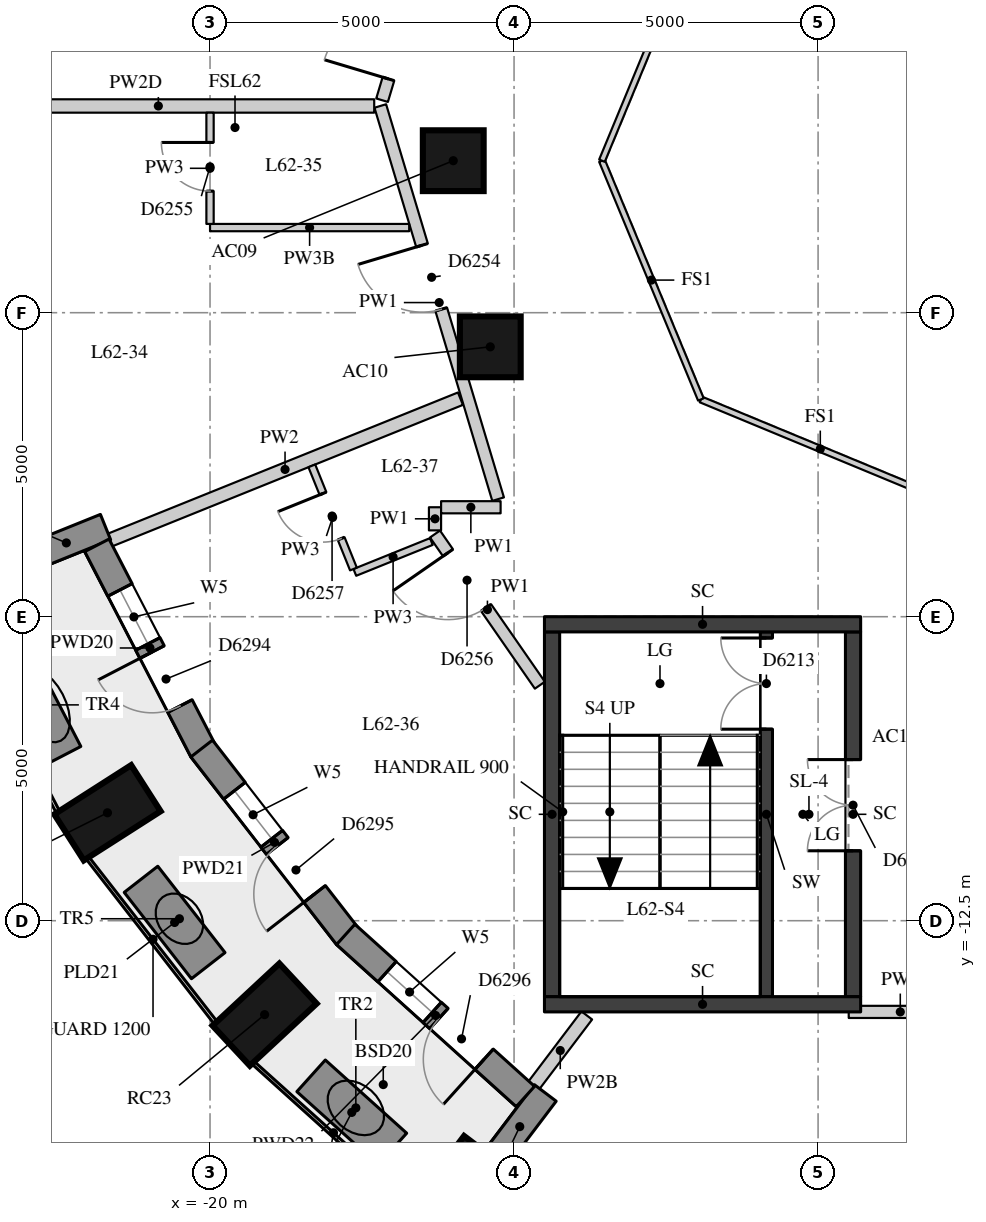
"""IFC4 building model, lengths in metres.
Left out: names, types, materials, properties, quantities, classifications, styles, units other than length and angle.
Written with IfcOpenShell. Run it as: python <this file> out.ifc"""

import sys

from ifc_helpers import new_model, si_unit, direction, frame, frame_2d, origin, origin_2d, place, context, subcontext, project, spatial, rectangle, extrude, element, fill, save


model = new_model("IFC4")
c1 = context("Model", 3, precision=1e-05, world=origin(), true_north=direction((0.0, 1.0)))
c2 = subcontext(c1, "Body", "Model", "MODEL_VIEW")
j1 = project(units=[si_unit("LENGTHUNIT", "METRE"), si_unit("PLANEANGLEUNIT", "RADIAN")], contexts=[c1])
p1 = place(None, origin())
s1 = spatial("IfcSite", under=j1, at=p1, CompositionType="ELEMENT")
p2 = place(p1, origin())
s2 = spatial("IfcBuilding", under=s1, at=p2, CompositionType="ELEMENT")
p3 = place(p2, frame((0.0, 0.0, 218.9)))
s3 = spatial("IfcBuildingStorey", under=s2, at=p3, CompositionType="ELEMENT", Elevation=218.9)
for number, where, z_axis, x_axis in (
    (1, (-21.687, -10.725, 0.0), (0.0, 0.0, 1.0), (-0.842, -0.539, 0.0)),
    (2, (-19.102, -14.045, 0.0), (0.0, 0.0, 1.0), (-0.732, -0.681, 0.0)),
    (3, (-15.916, -16.911, 0.0), (0.0, 0.0, 1.0), (-0.604, -0.797, 0.0)),
):
    element("IfcColumn", number, at=place(p3, frame(where, z_axis=z_axis, x_axis=x_axis)), inside=s3, PredefinedType="COLUMN", context=c2, shape_type="SweptSolid", body=[
        extrude(rectangle(XDim=1.5, YDim=0.9, at=origin_2d()), origin(), (0.0, 0.0, 1.0), 3.3),
    ])
for number, where, z_axis, x_axis in (
    (4, (-16.0, 0.0, 0.0), (0.0, 0.0, 1.0), (1.0, 0.0, 0.0)),
    (5, (-15.391, -3.062, 0.0), (0.0, 0.0, 1.0), (1.0, 0.0, 0.0)),
):
    element("IfcColumn", number, at=place(p3, frame(where, z_axis=z_axis, x_axis=x_axis)), inside=s3, PredefinedType="COLUMN", context=c2, shape_type="SweptSolid", body=[
        extrude(rectangle(XDim=1.0, YDim=1.0, at=origin_2d()), origin(), (0.0, 0.0, 1.0), 3.3),
    ])
p4 = place(p3, frame((-23.008, -6.546, 0.0), z_axis=(0.0, 0.0, 1.0), x_axis=(0.927346156366, 0.37420463155, 0.0)))
e6 = element("IfcWall", 6, at=p4, inside=s3, PredefinedType="SOLIDWALL", context=c2, shape_type="SweptSolid", body=[
    extrude(rectangle(XDim=1.39, YDim=0.45, at=frame_2d((0.695, 0.0))), origin(), (0.0, 0.0, 1.0), 3.02),
])
p5 = place(p3, frame((-15.326, -16.442, 0.0), z_axis=(0.0, 0.0, 1.0), x_axis=(0.603644757989, 0.797253414011, 0.0)))
e7 = element("IfcWall", 7, at=p5, inside=s3, PredefinedType="SOLIDWALL", context=c2, shape_type="SweptSolid", body=[
    extrude(rectangle(XDim=1.391, YDim=0.45, at=frame_2d((0.695, 0.0))), origin(), (0.0, 0.0, 1.0), 2.57),
])
p6 = place(p3, frame((-21.861, -6.326, 0.0), z_axis=(0.0, 0.0, 1.0), x_axis=(0.45924645187, -0.888308896975, 0.0)))
e8 = element("IfcWall", 8, at=p6, inside=s3, PredefinedType="SOLIDWALL", context=c2, shape_type="SweptSolid", body=[
    extrude(rectangle(XDim=3.802, YDim=0.45, at=frame_2d((1.901, 0.0))), origin(), (0.0, 0.0, 1.0), 3.02),
])
p7 = place(p6, frame((0.826, 0.0, 0.4)))
e9 = element("IfcOpeningElement", 9, at=p7, cuts=e8, PredefinedType="OPENING", context=c2, shape_type="SweptSolid", body=[
    extrude(rectangle(XDim=1.0, YDim=1.75, at=frame_2d((0.5, 0.875))), frame((0.0, 0.235, 0.0), z_axis=(0.0, -1.0, 0.0), x_axis=(1.0, 0.0, 0.0)), (0.0, 0.0, 1.0), 0.47),
])
p8 = place(p6, frame((1.976, 0.0, 0.0)))
e10 = element("IfcOpeningElement", 10, at=p8, cuts=e8, PredefinedType="OPENING", context=c2, shape_type="SweptSolid", body=[
    extrude(rectangle(XDim=1.0, YDim=2.15, at=frame_2d((0.5, 1.075))), frame((0.0, 0.235, 0.0), z_axis=(0.0, -1.0, 0.0), x_axis=(1.0, 0.0, 0.0)), (0.0, 0.0, 1.0), 0.47),
])
p9 = place(p3, frame((-20.137, -9.668, 0.0), z_axis=(0.0, 0.0, 1.0), x_axis=(0.613157177014, -0.789960933386, 0.0)))
e11 = element("IfcWall", 11, at=p9, inside=s3, PredefinedType="SOLIDWALL", context=c2, shape_type="SweptSolid", body=[
    extrude(rectangle(XDim=3.906, YDim=0.45, at=frame_2d((1.953, 0.0))), origin(), (0.0, 0.0, 1.0), 3.02),
])
p10 = place(p9, frame((0.878, 0.0, 0.4)))
e12 = element("IfcOpeningElement", 12, at=p10, cuts=e11, PredefinedType="OPENING", context=c2, shape_type="SweptSolid", body=[
    extrude(rectangle(XDim=1.0, YDim=1.75, at=frame_2d((0.5, 0.875))), frame((0.0, 0.235, 0.0), z_axis=(0.0, -1.0, 0.0), x_axis=(1.0, 0.0, 0.0)), (0.0, 0.0, 1.0), 0.47),
])
p11 = place(p9, frame((2.028, 0.0, 0.0)))
e13 = element("IfcOpeningElement", 13, at=p11, cuts=e11, PredefinedType="OPENING", context=c2, shape_type="SweptSolid", body=[
    extrude(rectangle(XDim=1.0, YDim=2.15, at=frame_2d((0.5, 1.075))), frame((0.0, 0.235, 0.0), z_axis=(0.0, -1.0, 0.0), x_axis=(1.0, 0.0, 0.0)), (0.0, 0.0, 1.0), 0.47),
])
p12 = place(p3, frame((-17.769, -12.725, 0.0), z_axis=(0.0, 0.0, 1.0), x_axis=(0.742485377568, -0.669862272484, 0.0)))
e14 = element("IfcWall", 14, at=p12, inside=s3, PredefinedType="SOLIDWALL", context=c2, shape_type="SweptSolid", body=[
    extrude(rectangle(XDim=3.98, YDim=0.45, at=frame_2d((1.99, 0.0))), origin(), (0.0, 0.0, 1.0), 3.02),
])
p13 = place(p12, frame((0.915, 0.0, 0.4)))
e15 = element("IfcOpeningElement", 15, at=p13, cuts=e14, PredefinedType="OPENING", context=c2, shape_type="SweptSolid", body=[
    extrude(rectangle(XDim=1.0, YDim=1.75, at=frame_2d((0.5, 0.875))), frame((0.0, 0.235, 0.0), z_axis=(0.0, -1.0, 0.0), x_axis=(1.0, 0.0, 0.0)), (0.0, 0.0, 1.0), 0.47),
])
p14 = place(p12, frame((2.065, 0.0, 0.0)))
e16 = element("IfcOpeningElement", 16, at=p14, cuts=e14, PredefinedType="OPENING", context=c2, shape_type="SweptSolid", body=[
    extrude(rectangle(XDim=1.0, YDim=2.15, at=frame_2d((0.5, 1.075))), frame((0.0, 0.235, 0.0), z_axis=(0.0, -1.0, 0.0), x_axis=(1.0, 0.0, 0.0)), (0.0, 0.0, 1.0), 0.47),
])
for number, where, z_axis, x_axis in (
    (17, (-23.264, -8.197, 0.0), (0.0, 0.0, 1.0), (0.46, -0.888, 0.0)),
    (18, (-21.135, -11.819, 0.0), (0.0, 0.0, 1.0), (0.614, -0.789, 0.0)),
    (19, (-18.338, -15.051, 0.0), (0.0, 0.0, 1.0), (0.743, -0.669, 0.0)),
):
    element("IfcWall", number, at=place(p3, frame(where, z_axis=z_axis, x_axis=x_axis)), inside=s3, PredefinedType="USERDEFINED", context=c2, shape_type="SweptSolid", body=[
        extrude(rectangle(XDim=1.8, YDim=0.7, at=frame_2d((0.9, 0.0))), origin(), (0.0, 0.0, 1.0), 0.75),
    ])
p15 = place(p3, frame((-10.85, -13.75, 0.0), z_axis=(0.0, 0.0, 1.0), x_axis=(0.0, 1.0, 0.0)))
e20 = element("IfcWall", 20, at=p15, inside=s3, PredefinedType="SHEAR", context=c2, shape_type="SweptSolid", body=[
    extrude(rectangle(XDim=6.0, YDim=0.2, at=frame_2d((3.0, 0.0))), origin(), (0.0, 0.0, 1.0), 3.02),
])
p16 = place(p15, frame((4.4, 0.0, 0.0)))
e21 = element("IfcOpeningElement", 21, at=p16, cuts=e20, PredefinedType="OPENING", context=c2, shape_type="SweptSolid", body=[
    extrude(rectangle(XDim=1.5, YDim=2.1, at=frame_2d((0.75, 1.05))), frame((0.0, 0.11, 0.0), z_axis=(0.0, -1.0, 0.0), x_axis=(1.0, 0.0, 0.0)), (0.0, 0.0, 1.0), 0.22),
])
p17 = place(p3, frame((-14.375, -13.75, -0.28), z_axis=(0.0, 0.0, 1.0), x_axis=(0.0, 1.0, 0.0)))
e22 = element("IfcWall", 22, at=p17, inside=s3, PredefinedType="SHEAR", context=c2, shape_type="SweptSolid", body=[
    extrude(rectangle(XDim=6.0, YDim=0.25, at=frame_2d((3.0, 0.0))), origin(), (0.0, 0.0, 1.0), 3.3),
])
p18 = place(p3, frame((-9.425, -13.75, -0.28), z_axis=(0.0, 0.0, 1.0), x_axis=(0.0, 1.0, 0.0)))
e23 = element("IfcWall", 23, at=p18, inside=s3, PredefinedType="SHEAR", context=c2, shape_type="SweptSolid", body=[
    extrude(rectangle(XDim=6.0, YDim=0.25, at=frame_2d((3.0, 0.0))), origin(), (0.0, 0.0, 1.0), 3.3),
])
p19 = place(p18, frame((2.4, 0.0, 0.28)))
e24 = element("IfcOpeningElement", 24, at=p19, cuts=e23, PredefinedType="OPENING", context=c2, shape_type="SweptSolid", body=[
    extrude(rectangle(XDim=1.5, YDim=2.1, at=frame_2d((0.75, 1.05))), frame((0.0, 0.135, 0.0), z_axis=(0.0, -1.0, 0.0), x_axis=(1.0, 0.0, 0.0)), (0.0, 0.0, 1.0), 0.27),
])
for number, where, z_axis, x_axis in (
    (25, (-14.5, -7.625, -0.28), (0.0, 0.0, 1.0), (1.0, 0.0, 0.0)),
    (26, (-14.5, -13.875, -0.28), (0.0, 0.0, 1.0), (1.0, 0.0, 0.0)),
):
    element("IfcWall", number, at=place(p3, frame(where, z_axis=z_axis, x_axis=x_axis)), inside=s3, PredefinedType="SHEAR", context=c2, shape_type="SweptSolid", body=[
        extrude(rectangle(XDim=5.2, YDim=0.25, at=frame_2d((2.6, 0.0))), origin(), (0.0, 0.0, 1.0), 3.3),
    ])
p20 = place(p3, frame((-7.8, -14.0, 0.0), z_axis=(0.0, 0.0, 1.0), x_axis=(-1.0, 0.0, 0.0)))
e27 = element("IfcWall", 27, at=p20, inside=s3, PredefinedType="PARTITIONING", context=c2, shape_type="SweptSolid", body=[
    extrude(rectangle(XDim=1.696, YDim=0.2, at=frame_2d((0.848, 0.0))), origin(), (0.0, 0.0, 1.0), 3.02),
])
p21 = place(p3, frame((-14.575, -8.627, 0.0), z_axis=(0.0, 0.0, 1.0), x_axis=(-0.569910381143, 0.821706856163, 0.0)))
e28 = element("IfcWall", 28, at=p21, inside=s3, PredefinedType="PARTITIONING", context=c2, shape_type="SweptSolid", body=[
    extrude(rectangle(XDim=3.026, YDim=0.2, at=frame_2d((1.513, 0.0))), origin(), (0.0, 0.0, 1.0), 3.02),
])
p22 = place(p21, frame((1.552, 0.0, 0.0)))
e29 = element("IfcOpeningElement", 29, at=p22, cuts=e28, PredefinedType="OPENING", context=c2, shape_type="SweptSolid", body=[
    extrude(rectangle(XDim=1.1, YDim=2.1, at=frame_2d((0.55, 1.05))), frame((0.0, 0.11, 0.0), z_axis=(0.0, -1.0, 0.0), x_axis=(1.0, 0.0, 0.0)), (0.0, 0.0, 1.0), 0.22),
])
p23 = place(p3, frame((-16.3, -6.08, 0.0), z_axis=(0.0, 0.0, 1.0), x_axis=(0.0, 1.0, 0.0)))
e30 = element("IfcWall", 30, at=p23, inside=s3, PredefinedType="PARTITIONING", context=c2, shape_type="SweptSolid", body=[
    extrude(rectangle(XDim=0.38, YDim=0.2, at=frame_2d((0.19, 0.0))), origin(), (0.0, 0.0, 1.0), 3.02),
])
p24 = place(p3, frame((-16.2, -5.7, 0.0), z_axis=(0.0, 0.0, 1.0), x_axis=(1.0, 0.0, 0.0)))
e31 = element("IfcWall", 31, at=p24, inside=s3, PredefinedType="PARTITIONING", context=c2, shape_type="SweptSolid", body=[
    extrude(rectangle(XDim=0.979, YDim=0.2, at=frame_2d((0.489, 0.0))), origin(), (0.0, 0.0, 1.0), 3.02),
])
p25 = place(p3, frame((-15.262, -5.567, 0.0), z_axis=(0.0, 0.0, 1.0), x_axis=(-0.28704593875, 0.957916817395, 0.0)))
e32 = element("IfcWall", 32, at=p25, inside=s3, PredefinedType="PARTITIONING", context=c2, shape_type="SweptSolid", body=[
    extrude(rectangle(XDim=6.751, YDim=0.2, at=frame_2d((3.375, 0.0))), origin(), (0.0, 0.0, 1.0), 3.02),
])
p26 = place(p25, frame((3.259, 0.0, 0.0)))
e33 = element("IfcOpeningElement", 33, at=p26, cuts=e32, PredefinedType="OPENING", context=c2, shape_type="SweptSolid", body=[
    extrude(rectangle(XDim=1.1, YDim=2.1, at=frame_2d((0.55, 1.05))), frame((0.0, 0.11, 0.0), z_axis=(0.0, -1.0, 0.0), x_axis=(1.0, 0.0, 0.0)), (0.0, 0.0, 1.0), 0.22),
])
p27 = place(p3, frame((-17.171, 0.995, 0.0), z_axis=(0.0, 0.0, 1.0), x_axis=(0.286919722033, 0.957954629984, 0.0)))
e34 = element("IfcWall", 34, at=p27, inside=s3, PredefinedType="PARTITIONING", context=c2, shape_type="SweptSolid", body=[
    extrude(rectangle(XDim=3.034, YDim=0.2, at=frame_2d((1.517, 0.0))), origin(), (0.0, 0.0, 1.0), 3.02),
])
p28 = place(p27, frame((0.365, 0.0, 0.0)))
e35 = element("IfcOpeningElement", 35, at=p28, cuts=e34, PredefinedType="OPENING", context=c2, shape_type="SweptSolid", body=[
    extrude(rectangle(XDim=1.1, YDim=2.1, at=frame_2d((0.55, 1.05))), frame((0.0, 0.11, 0.0), z_axis=(0.0, -1.0, 0.0), x_axis=(1.0, 0.0, 0.0)), (0.0, 0.0, 1.0), 0.22),
])
p29 = place(p3, frame((-24.4, 0.9, 0.0), z_axis=(0.0, 0.0, 1.0), x_axis=(1.0, 0.0, 0.0)))
e36 = element("IfcWall", 36, at=p29, inside=s3, PredefinedType="PARTITIONING", context=c2, shape_type="SweptSolid", body=[
    extrude(rectangle(XDim=7.1, YDim=0.22, at=frame_2d((3.55, 0.0))), origin(), (0.0, 0.0, 1.0), 2.47),
])
p30 = place(p3, frame((-21.651, -6.241, 0.0), z_axis=(0.0, 0.0, 1.0), x_axis=(0.927390089179, 0.37409573974, 0.0)))
e37 = element("IfcWall", 37, at=p30, inside=s3, PredefinedType="PARTITIONING", context=c2, shape_type="SweptSolid", body=[
    extrude(rectangle(XDim=6.221, YDim=0.22, at=frame_2d((3.11, 0.0))), origin(), (0.0, 0.0, 1.0), 3.02),
])
p31 = place(p3, frame((-14.677, -15.211, 0.0), z_axis=(0.0, 0.0, 1.0), x_axis=(0.60355868562, 0.797318576864, 0.0)))
e38 = element("IfcWall", 38, at=p31, inside=s3, PredefinedType="PARTITIONING", context=c2, shape_type="SweptSolid", body=[
    extrude(rectangle(XDim=1.447, YDim=0.22, at=frame_2d((0.723, 0.0))), origin(), (0.0, 0.0, 1.0), 2.57),
])
p32 = place(p3, frame((-16.725, -1.1, 0.0), z_axis=(0.0, 0.0, 1.0), x_axis=(-1.0, 0.0, 0.0)))
e39 = element("IfcWall", 39, at=p32, inside=s3, PredefinedType="PARTITIONING", context=c2, shape_type="SweptSolid", body=[
    extrude(rectangle(XDim=3.275, YDim=0.12, at=frame_2d((1.638, 0.0))), origin(), (0.0, 0.0, 1.0), 2.47),
])
p33 = place(p3, frame((-16.36, -6.264, 0.0), z_axis=(0.0, 0.0, 1.0), x_axis=(-0.927381089245, -0.374118049967, 0.0)))
e40 = element("IfcWall", 40, at=p33, inside=s3, PredefinedType="PARTITIONING", context=c2, shape_type="SweptSolid", body=[
    extrude(rectangle(XDim=1.357, YDim=0.12, at=frame_2d((0.679, 0.0))), origin(), (0.0, 0.0, 1.0), 3.02),
])
p34 = place(p3, frame((-20.0, -1.04, 0.0), z_axis=(0.0, 0.0, 1.0), x_axis=(0.0, 1.0, 0.0)))
e41 = element("IfcWall", 41, at=p34, inside=s3, PredefinedType="PARTITIONING", context=c2, shape_type="SweptSolid", body=[
    extrude(rectangle(XDim=1.83, YDim=0.12, at=frame_2d((0.915, 0.0))), origin(), (0.0, 0.0, 1.0), 3.02),
])
p35 = place(p34, frame((0.54, 0.0, 0.0)))
e42 = element("IfcOpeningElement", 42, at=p35, cuts=e41, PredefinedType="OPENING", context=c2, shape_type="SweptSolid", body=[
    extrude(rectangle(XDim=0.8, YDim=2.1, at=frame_2d((0.4, 1.05))), frame((0.0, 0.07, 0.0), z_axis=(0.0, -1.0, 0.0), x_axis=(1.0, 0.0, 0.0)), (0.0, 0.0, 1.0), 0.14),
])
p36 = place(p3, frame((-17.641, -6.716, 0.0), z_axis=(0.0, 0.0, 1.0), x_axis=(-0.374103450988, 0.927386978536, 0.0)))
e43 = element("IfcWall", 43, at=p36, inside=s3, PredefinedType="PARTITIONING", context=c2, shape_type="SweptSolid", body=[
    extrude(rectangle(XDim=1.83, YDim=0.12, at=frame_2d((0.915, 0.0))), origin(), (0.0, 0.0, 1.0), 3.02),
])
p37 = place(p36, frame((0.54, 0.0, 0.0)))
e44 = element("IfcOpeningElement", 44, at=p37, cuts=e43, PredefinedType="OPENING", context=c2, shape_type="SweptSolid", body=[
    extrude(rectangle(XDim=0.8, YDim=2.1, at=frame_2d((0.4, 1.05))), frame((0.0, 0.07, 0.0), z_axis=(0.0, -1.0, 0.0), x_axis=(1.0, 0.0, 0.0)), (0.0, 0.0, 1.0), 0.14),
])
for number, where, z_axis, x_axis in (
    (45, (-8.0, -5.554, 0.0), (0.0, 0.0, 1.0), (-0.924, 0.383, 0.0)),
    (46, (-11.927, -3.927, 0.0), (0.0, 0.0, 1.0), (-0.383, 0.924, 0.0)),
    (47, (-13.554, 0.0, 0.0), (0.0, 0.0, 1.0), (0.383, 0.924, 0.0)),
):
    element("IfcWall", number, at=place(p3, frame(where, z_axis=z_axis, x_axis=x_axis)), inside=s3, PredefinedType="PARTITIONING", context=c2, shape_type="SweptSolid", body=[
        extrude(rectangle(XDim=4.251, YDim=0.1, at=frame_2d((2.125, 0.0))), origin(), (0.0, 0.0, 1.0), 3.02),
    ])
p38 = place(p7, origin())
e48 = element("IfcWindow", 48, at=p38, inside=s3, PartitioningType="SINGLE_PANEL", PredefinedType="WINDOW", context=c2, shape_type="SweptSolid", body=[
    extrude(rectangle(XDim=1.0, YDim=1.75, at=frame_2d((0.5, 0.875))), frame((0.0, 0.035, 0.0), z_axis=(0.0, -1.0, 0.0), x_axis=(1.0, 0.0, 0.0)), (0.0, 0.0, 1.0), 0.06),
])
fill(e9, e48)
p39 = place(p8, frame((1.0, 0.0, 0.0), z_axis=(0.0, 0.0, 1.0), x_axis=(-1.0, 0.0, 0.0)))
e49 = element("IfcDoor", 49, at=p39, inside=s3, OperationType="SINGLE_SWING_RIGHT", PredefinedType="DOOR", context=c2, shape_type="SweptSolid", body=[
    extrude(rectangle(XDim=1.0, YDim=2.15, at=frame_2d((0.5, 1.075))), frame((0.0, 0.075, 0.0), z_axis=(0.0, -1.0, 0.0), x_axis=(1.0, 0.0, 0.0)), (0.0, 0.0, 1.0), 0.05),
])
fill(e10, e49)
p40 = place(p10, origin())
e50 = element("IfcWindow", 50, at=p40, inside=s3, PartitioningType="SINGLE_PANEL", PredefinedType="WINDOW", context=c2, shape_type="SweptSolid", body=[
    extrude(rectangle(XDim=1.0, YDim=1.75, at=frame_2d((0.5, 0.875))), frame((0.0, 0.035, 0.0), z_axis=(0.0, -1.0, 0.0), x_axis=(1.0, 0.0, 0.0)), (0.0, 0.0, 1.0), 0.06),
])
fill(e12, e50)
p41 = place(p11, frame((1.0, 0.0, 0.0), z_axis=(0.0, 0.0, 1.0), x_axis=(-1.0, 0.0, 0.0)))
e51 = element("IfcDoor", 51, at=p41, inside=s3, OperationType="SINGLE_SWING_LEFT", PredefinedType="DOOR", context=c2, shape_type="SweptSolid", body=[
    extrude(rectangle(XDim=1.0, YDim=2.15, at=frame_2d((0.5, 1.075))), frame((0.0, 0.075, 0.0), z_axis=(0.0, -1.0, 0.0), x_axis=(1.0, 0.0, 0.0)), (0.0, 0.0, 1.0), 0.05),
])
fill(e13, e51)
p42 = place(p13, origin())
e52 = element("IfcWindow", 52, at=p42, inside=s3, PartitioningType="SINGLE_PANEL", PredefinedType="WINDOW", context=c2, shape_type="SweptSolid", body=[
    extrude(rectangle(XDim=1.0, YDim=1.75, at=frame_2d((0.5, 0.875))), frame((0.0, 0.035, 0.0), z_axis=(0.0, -1.0, 0.0), x_axis=(1.0, 0.0, 0.0)), (0.0, 0.0, 1.0), 0.06),
])
fill(e15, e52)
p43 = place(p14, frame((1.0, 0.0, 0.0), z_axis=(0.0, 0.0, 1.0), x_axis=(-1.0, 0.0, 0.0)))
e53 = element("IfcDoor", 53, at=p43, inside=s3, OperationType="SINGLE_SWING_LEFT", PredefinedType="DOOR", context=c2, shape_type="SweptSolid", body=[
    extrude(rectangle(XDim=1.0, YDim=2.15, at=frame_2d((0.5, 1.075))), frame((0.0, 0.075, 0.0), z_axis=(0.0, -1.0, 0.0), x_axis=(1.0, 0.0, 0.0)), (0.0, 0.0, 1.0), 0.05),
])
fill(e16, e53)
p44 = place(p16, origin())
e54 = element("IfcDoor", 54, at=p44, inside=s3, OperationType="DOUBLE_DOOR_SINGLE_SWING", PredefinedType="DOOR", context=c2, shape_type="SweptSolid", body=[
    extrude(rectangle(XDim=1.5, YDim=2.1, at=frame_2d((0.75, 1.05))), frame((0.0, 0.025, 0.0), z_axis=(0.0, -1.0, 0.0), x_axis=(1.0, 0.0, 0.0)), (0.0, 0.0, 1.0), 0.05),
])
fill(e21, e54)
p45 = place(p19, origin())
e55 = element("IfcDoor", 55, at=p45, inside=s3, OperationType="DOUBLE_DOOR_SINGLE_SWING", PredefinedType="DOOR", context=c2, shape_type="SweptSolid", body=[
    extrude(rectangle(XDim=1.5, YDim=2.1, at=frame_2d((0.75, 1.05))), frame((0.0, 0.025, 0.0), z_axis=(0.0, -1.0, 0.0), x_axis=(1.0, 0.0, 0.0)), (0.0, 0.0, 1.0), 0.05),
])
fill(e24, e55)
p46 = place(p28, origin())
e56 = element("IfcDoor", 56, at=p46, inside=s3, OperationType="SINGLE_SWING_LEFT", PredefinedType="DOOR", context=c2, shape_type="SweptSolid", body=[
    extrude(rectangle(XDim=1.1, YDim=2.1, at=frame_2d((0.55, 1.05))), frame((0.0, 0.025, 0.0), z_axis=(0.0, -1.0, 0.0), x_axis=(1.0, 0.0, 0.0)), (0.0, 0.0, 1.0), 0.05),
])
fill(e35, e56)
p47 = place(p26, origin())
e57 = element("IfcDoor", 57, at=p47, inside=s3, OperationType="SINGLE_SWING_RIGHT", PredefinedType="DOOR", context=c2, shape_type="SweptSolid", body=[
    extrude(rectangle(XDim=1.1, YDim=2.1, at=frame_2d((0.55, 1.05))), frame((0.0, 0.025, 0.0), z_axis=(0.0, -1.0, 0.0), x_axis=(1.0, 0.0, 0.0)), (0.0, 0.0, 1.0), 0.05),
])
fill(e33, e57)
p48 = place(p35, origin())
e58 = element("IfcDoor", 58, at=p48, inside=s3, OperationType="SINGLE_SWING_RIGHT", PredefinedType="DOOR", context=c2, shape_type="SweptSolid", body=[
    extrude(rectangle(XDim=0.8, YDim=2.1, at=frame_2d((0.4, 1.05))), frame((0.0, 0.025, 0.0), z_axis=(0.0, -1.0, 0.0), x_axis=(1.0, 0.0, 0.0)), (0.0, 0.0, 1.0), 0.05),
])
fill(e42, e58)
p49 = place(p22, origin())
e59 = element("IfcDoor", 59, at=p49, inside=s3, OperationType="SINGLE_SWING_RIGHT", PredefinedType="DOOR", context=c2, shape_type="SweptSolid", body=[
    extrude(rectangle(XDim=1.1, YDim=2.1, at=frame_2d((0.55, 1.05))), frame((0.0, 0.025, 0.0), z_axis=(0.0, -1.0, 0.0), x_axis=(1.0, 0.0, 0.0)), (0.0, 0.0, 1.0), 0.05),
])
fill(e29, e59)
p50 = place(p37, origin())
e60 = element("IfcDoor", 60, at=p50, inside=s3, OperationType="SINGLE_SWING_RIGHT", PredefinedType="DOOR", context=c2, shape_type="SweptSolid", body=[
    extrude(rectangle(XDim=0.8, YDim=2.1, at=frame_2d((0.4, 1.05))), frame((0.0, 0.025, 0.0), z_axis=(0.0, -1.0, 0.0), x_axis=(1.0, 0.0, 0.0)), (0.0, 0.0, 1.0), 0.05),
])
fill(e44, e60)
save(model, sys.argv[1])
